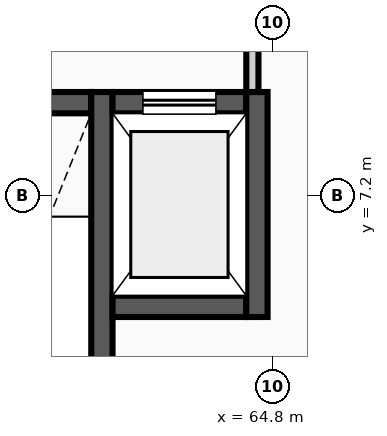
"""IFC4 building model, lengths in metres.
Left out: names, types, materials, properties, quantities, classifications, styles, units other than length and angle.
Written with IfcOpenShell. Run it as: python <this file> out.ifc"""

import sys

from ifc_helpers import new_model, si_unit, direction, frame, frame_2d, origin, place, context, subcontext, project, spatial, rectangle, extrude, element, fill, save


model = new_model("IFC4")
c1 = context("Model", 3, precision=1e-05, world=origin(), true_north=direction((0.0, 1.0)))
c2 = subcontext(c1, "Body", "Model", "MODEL_VIEW")
j1 = project(units=[si_unit("LENGTHUNIT", "METRE"), si_unit("PLANEANGLEUNIT", "RADIAN")], contexts=[c1])
p1 = place(None, origin())
s1 = spatial("IfcSite", under=j1, at=p1, CompositionType="ELEMENT")
p2 = place(p1, origin())
s2 = spatial("IfcBuilding", under=s1, at=p2, CompositionType="ELEMENT")
p3 = place(p2, frame((0.0, 0.0, 18.4)))
s3 = spatial("IfcBuildingStorey", under=s2, at=p3, CompositionType="ELEMENT", Elevation=18.4)
p4 = place(p3, frame((58.67, 8.725, 0.0), z_axis=(0.0, 0.0, 1.0), x_axis=(1.0, 0.0, 0.0)))
e1 = element("IfcWall", 1, at=p4, inside=s3, PredefinedType="SHEAR", context=c2, shape_type="SweptSolid", body=[
    extrude(rectangle(XDim=3.15, YDim=0.35, at=frame_2d((1.575, 0.0))), origin(), (0.0, 0.0, 1.0), 4.18),
])
p5 = place(p4, frame((1.025, 0.0, 0.0)))
e2 = element("IfcOpeningElement", 2, at=p5, cuts=e1, PredefinedType="OPENING", context=c2, shape_type="SweptSolid", body=[
    extrude(rectangle(XDim=1.1, YDim=2.15, at=frame_2d((0.55, 1.075))), frame((0.0, 0.185, 0.0), z_axis=(0.0, -1.0, 0.0), x_axis=(1.0, 0.0, 0.0)), (0.0, 0.0, 1.0), 0.37),
])
p6 = place(p3, frame((61.995, 0.4, 0.0), z_axis=(0.0, 0.0, 1.0), x_axis=(0.0, 1.0, 0.0)))
e3 = element("IfcWall", 3, at=p6, inside=s3, PredefinedType="SHEAR", context=c2, shape_type="SweptSolid", body=[
    extrude(rectangle(XDim=8.5, YDim=0.35, at=frame_2d((4.25, 0.0))), origin(), (0.0, 0.0, 1.0), 4.18),
])
p7 = place(p3, frame((62.17, 5.375, 0.0), z_axis=(0.0, 0.0, 1.0), x_axis=(1.0, 0.0, 0.0)))
e4 = element("IfcWall", 4, at=p7, inside=s3, PredefinedType="SHEAR", context=c2, shape_type="SweptSolid", body=[
    extrude(rectangle(XDim=2.2, YDim=0.35, at=frame_2d((1.1, 0.0))), origin(), (0.0, 0.0, 1.0), 4.18),
])
p8 = place(p3, frame((62.17, 8.725, 0.0), z_axis=(0.0, 0.0, 1.0), x_axis=(1.0, 0.0, 0.0)))
e5 = element("IfcWall", 5, at=p8, inside=s3, PredefinedType="SHEAR", context=c2, shape_type="SweptSolid", body=[
    extrude(rectangle(XDim=2.2, YDim=0.35, at=frame_2d((1.1, 0.0))), origin(), (0.0, 0.0, 1.0), 4.18),
])
p9 = place(p8, frame((0.5, 0.0, 0.0)))
e6 = element("IfcOpeningElement", 6, at=p9, cuts=e5, PredefinedType="OPENING", context=c2, shape_type="SweptSolid", body=[
    extrude(rectangle(XDim=1.2, YDim=2.2, at=frame_2d((0.6, 1.1))), frame((0.0, 0.185, 0.0), z_axis=(0.0, -1.0, 0.0), x_axis=(1.0, 0.0, 0.0)), (0.0, 0.0, 1.0), 0.37),
])
p10 = place(p3, frame((64.545, 5.2, 0.0), z_axis=(0.0, 0.0, 1.0), x_axis=(0.0, 1.0, 0.0)))
e7 = element("IfcWall", 7, at=p10, inside=s3, PredefinedType="SHEAR", context=c2, shape_type="SweptSolid", body=[
    extrude(rectangle(XDim=3.7, YDim=0.35, at=frame_2d((1.85, 0.0))), origin(), (0.0, 0.0, 1.0), 4.18),
])
p11 = place(p3, frame((64.47, 8.9, 0.0), z_axis=(0.0, 0.0, 1.0), x_axis=(0.0, 1.0, 0.0)))
e8 = element("IfcWall", 8, at=p11, inside=s3, PredefinedType="PARTITIONING", context=c2, shape_type="SweptSolid", body=[
    extrude(rectangle(XDim=2.45, YDim=0.2, at=frame_2d((1.225, 0.0))), origin(), (0.0, 0.0, 1.0), 4.18),
])
p12 = place(p9, origin())
e9 = element("IfcDoor", 9, at=p12, inside=s3, OperationType="SLIDING_TO_RIGHT", PredefinedType="DOOR", context=c2, shape_type="SweptSolid", body=[
    extrude(rectangle(XDim=1.2, YDim=2.2, at=frame_2d((0.6, 1.1))), frame((0.0, 0.025, 0.0), z_axis=(0.0, -1.0, 0.0), x_axis=(1.0, 0.0, 0.0)), (0.0, 0.0, 1.0), 0.05),
])
fill(e6, e9)
save(model, sys.argv[1])
